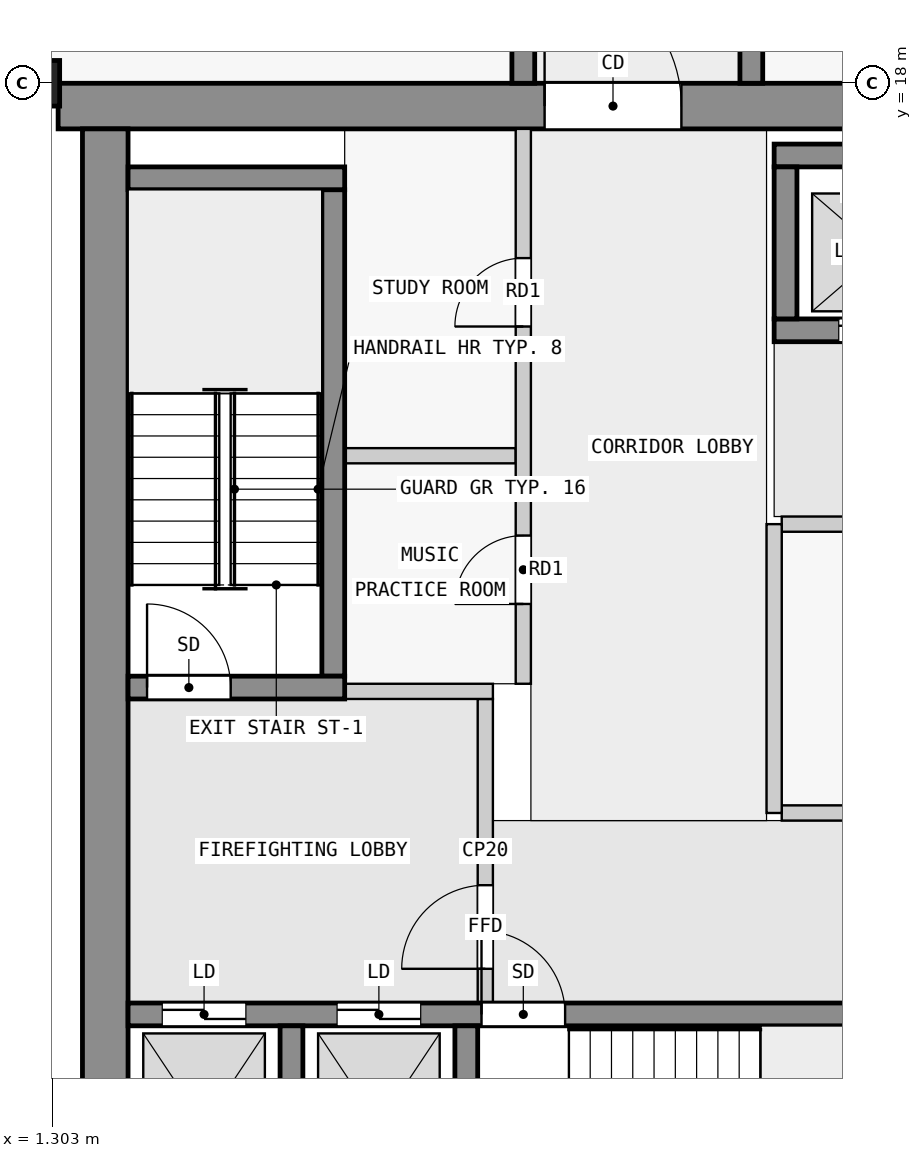
"""IFC4 building model, lengths in metres.
Left out: names, types, materials, properties, quantities, classifications, styles, units other than length and angle.
Written with IfcOpenShell. Run it as: python <this file> out.ifc"""

import sys

from ifc_helpers import new_model, si_unit, direction, frame, frame_2d, origin, origin_2d, place, context, subcontext, project, spatial, rectangle, extrude, element, fill, save


model = new_model("IFC4")
c1 = context("Model", 3, precision=1e-05, world=origin(), true_north=direction((0.0, 1.0)))
c2 = subcontext(c1, "Body", "Model", "MODEL_VIEW")
j1 = project(units=[si_unit("LENGTHUNIT", "METRE"), si_unit("PLANEANGLEUNIT", "RADIAN")], contexts=[c1])
p1 = place(None, origin())
s1 = spatial("IfcSite", under=j1, at=p1, CompositionType="ELEMENT")
p2 = place(p1, origin())
s2 = spatial("IfcBuilding", under=s1, at=p2, CompositionType="ELEMENT")
p3 = place(p2, frame((0.0, 0.0, 163.9)))
s3 = spatial("IfcBuildingStorey", under=s2, at=p3, CompositionType="ELEMENT", Elevation=163.9)
p4 = place(p3, frame((0.7, 18.0, 0.0), z_axis=(0.0, 0.0, 1.0), x_axis=(0.0, 1.0, 0.0)))
e1 = element("IfcColumn", 1, at=p4, inside=s3, PredefinedType="COLUMN", context=c2, shape_type="SweptSolid", body=[
    extrude(rectangle(XDim=0.6, YDim=1.4, at=origin_2d()), origin(), (0.0, 0.0, 1.0), 3.5),
])
p5 = place(p3, frame((1.38, 17.7, 0.0), z_axis=(0.0, 0.0, 1.0), x_axis=(1.0, 0.0, 0.0)))
e2 = element("IfcWall", 2, at=p5, inside=s3, PredefinedType="SHEAR", context=c2, shape_type="SweptSolid", body=[
    extrude(rectangle(XDim=21.12, YDim=0.6, at=frame_2d((10.56, 0.0))), origin(), (0.0, 0.0, 1.0), 3.25),
])
p6 = place(p5, frame((6.4, 0.0, 0.0)))
e3 = element("IfcOpeningElement", 3, at=p6, cuts=e2, PredefinedType="OPENING", context=c2, shape_type="SweptSolid", body=[
    extrude(rectangle(XDim=1.8, YDim=2.1, at=frame_2d((0.9, 1.05))), frame((0.0, 0.31, 0.0), z_axis=(0.0, -1.0, 0.0), x_axis=(1.0, 0.0, 0.0)), (0.0, 0.0, 1.0), 0.62),
])
p7 = place(p3, frame((2.0, 2.5, 0.0), z_axis=(0.0, 0.0, 1.0), x_axis=(0.0, 1.0, 0.0)))
e4 = element("IfcWall", 4, at=p7, inside=s3, PredefinedType="SHEAR", context=c2, shape_type="SweptSolid", body=[
    extrude(rectangle(XDim=14.9, YDim=0.6, at=frame_2d((7.45, 0.0))), origin(), (0.0, 0.0, 1.0), 3.25),
])
for number, where, z_axis, x_axis in (
    (5, (4.45, 2.8, 0.0), (0.0, 0.0, 1.0), (0.0, 1.0, 0.0)),
    (6, (6.75, 2.8, 0.0), (0.0, 0.0, 1.0), (0.0, 1.0, 0.0)),
):
    element("IfcWall", number, at=place(p3, frame(where, z_axis=z_axis, x_axis=x_axis)), inside=s3, PredefinedType="SHEAR", context=c2, shape_type="SweptSolid", body=[
        extrude(rectangle(XDim=2.8, YDim=0.3, at=frame_2d((1.4, 0.0))), origin(), (0.0, 0.0, 1.0), 3.25),
    ])
p8 = place(p3, frame((2.3, 5.75, 0.0), z_axis=(0.0, 0.0, 1.0), x_axis=(1.0, 0.0, 0.0)))
e7 = element("IfcWall", 7, at=p8, inside=s3, PredefinedType="SHEAR", context=c2, shape_type="SweptSolid", body=[
    extrude(rectangle(XDim=18.8, YDim=0.3, at=frame_2d((9.4, 0.0))), origin(), (0.0, 0.0, 1.0), 3.25),
])
p9 = place(p8, frame((4.65, 0.0, 0.0)))
e8 = element("IfcOpeningElement", 8, at=p9, cuts=e7, PredefinedType="OPENING", context=c2, shape_type="SweptSolid", body=[
    extrude(rectangle(XDim=1.1, YDim=2.1, at=frame_2d((0.55, 1.05))), frame((0.0, 0.16, 0.0), z_axis=(0.0, -1.0, 0.0), x_axis=(1.0, 0.0, 0.0)), (0.0, 0.0, 1.0), 0.32),
])
p10 = place(p8, frame((0.45, 0.0, 0.0)))
e9 = element("IfcOpeningElement", 9, at=p10, cuts=e7, PredefinedType="OPENING", context=c2, shape_type="SweptSolid", body=[
    extrude(rectangle(XDim=1.1, YDim=2.1, at=frame_2d((0.55, 1.05))), frame((0.0, 0.16, 0.0), z_axis=(0.0, -1.0, 0.0), x_axis=(1.0, 0.0, 0.0)), (0.0, 0.0, 1.0), 0.32),
])
p11 = place(p8, frame((2.75, 0.0, 0.0)))
e10 = element("IfcOpeningElement", 10, at=p11, cuts=e7, PredefinedType="OPENING", context=c2, shape_type="SweptSolid", body=[
    extrude(rectangle(XDim=1.1, YDim=2.1, at=frame_2d((0.55, 1.05))), frame((0.0, 0.16, 0.0), z_axis=(0.0, -1.0, 0.0), x_axis=(1.0, 0.0, 0.0)), (0.0, 0.0, 1.0), 0.32),
])
p12 = place(p8, frame((11.95, 0.0, 0.0)))
e11 = element("IfcOpeningElement", 11, at=p12, cuts=e7, PredefinedType="OPENING", context=c2, shape_type="SweptSolid", body=[
    extrude(rectangle(XDim=0.9, YDim=2.1, at=frame_2d((0.45, 1.05))), frame((0.0, 0.16, 0.0), z_axis=(0.0, -1.0, 0.0), x_axis=(1.0, 0.0, 0.0)), (0.0, 0.0, 1.0), 0.32),
])
p13 = place(p8, frame((15.7, 0.0, 0.0)))
e12 = element("IfcOpeningElement", 12, at=p13, cuts=e7, PredefinedType="OPENING", context=c2, shape_type="SweptSolid", body=[
    extrude(rectangle(XDim=0.9, YDim=2.1, at=frame_2d((0.45, 1.05))), frame((0.0, 0.16, 0.0), z_axis=(0.0, -1.0, 0.0), x_axis=(1.0, 0.0, 0.0)), (0.0, 0.0, 1.0), 0.32),
])
p14 = place(p3, frame((2.3, 10.05, 0.0), z_axis=(0.0, 0.0, 1.0), x_axis=(1.0, 0.0, 0.0)))
e13 = element("IfcWall", 13, at=p14, inside=s3, PredefinedType="SHEAR", context=c2, shape_type="SweptSolid", body=[
    extrude(rectangle(XDim=2.85, YDim=0.3, at=frame_2d((1.425, 0.0))), origin(), (0.0, 0.0, 1.0), 3.25),
])
p15 = place(p14, frame((0.25, 0.0, 0.0)))
e14 = element("IfcOpeningElement", 14, at=p15, cuts=e13, PredefinedType="OPENING", context=c2, shape_type="SweptSolid", body=[
    extrude(rectangle(XDim=1.1, YDim=2.1, at=frame_2d((0.55, 1.05))), frame((0.0, 0.16, 0.0), z_axis=(0.0, -1.0, 0.0), x_axis=(1.0, 0.0, 0.0)), (0.0, 0.0, 1.0), 0.32),
])
p16 = place(p3, frame((5.0, 10.2, 0.0), z_axis=(0.0, 0.0, 1.0), x_axis=(0.0, 1.0, 0.0)))
e15 = element("IfcWall", 15, at=p16, inside=s3, PredefinedType="SHEAR", context=c2, shape_type="SweptSolid", body=[
    extrude(rectangle(XDim=6.4, YDim=0.3, at=frame_2d((3.2, 0.0))), origin(), (0.0, 0.0, 1.0), 3.25),
])
p17 = place(p3, frame((2.3, 16.75, 0.0), z_axis=(0.0, 0.0, 1.0), x_axis=(1.0, 0.0, 0.0)))
e16 = element("IfcWall", 16, at=p17, inside=s3, PredefinedType="SHEAR", context=c2, shape_type="SweptSolid", body=[
    extrude(rectangle(XDim=2.85, YDim=0.3, at=frame_2d((1.425, 0.0))), origin(), (0.0, 0.0, 1.0), 3.25),
])
p18 = place(p3, frame((10.8, 17.05, 0.0), z_axis=(0.0, 0.0, 1.0), x_axis=(1.0, 0.0, 0.0)))
e17 = element("IfcWall", 17, at=p18, inside=s3, PredefinedType="SHEAR", context=c2, shape_type="SweptSolid", body=[
    extrude(rectangle(XDim=7.8, YDim=0.3, at=frame_2d((3.9, 0.0))), origin(), (0.0, 0.0, 1.0), 3.25),
])
p19 = place(p3, frame((10.8, 14.75, 0.0), z_axis=(0.0, 0.0, 1.0), x_axis=(1.0, 0.0, 0.0)))
e18 = element("IfcWall", 18, at=p19, inside=s3, PredefinedType="SHEAR", context=c2, shape_type="SweptSolid", body=[
    extrude(rectangle(XDim=7.8, YDim=0.3, at=frame_2d((3.9, 0.0))), origin(), (0.0, 0.0, 1.0), 3.25),
])
p20 = place(p19, frame((0.85, 0.0, 0.0)))
e19 = element("IfcOpeningElement", 19, at=p20, cuts=e18, PredefinedType="OPENING", context=c2, shape_type="SweptSolid", body=[
    extrude(rectangle(XDim=1.1, YDim=2.1, at=frame_2d((0.55, 1.05))), frame((0.0, 0.16, 0.0), z_axis=(0.0, -1.0, 0.0), x_axis=(1.0, 0.0, 0.0)), (0.0, 0.0, 1.0), 0.32),
])
p21 = place(p19, frame((3.35, 0.0, 0.0)))
e20 = element("IfcOpeningElement", 20, at=p21, cuts=e18, PredefinedType="OPENING", context=c2, shape_type="SweptSolid", body=[
    extrude(rectangle(XDim=1.1, YDim=2.1, at=frame_2d((0.55, 1.05))), frame((0.0, 0.16, 0.0), z_axis=(0.0, -1.0, 0.0), x_axis=(1.0, 0.0, 0.0)), (0.0, 0.0, 1.0), 0.32),
])
p22 = place(p19, frame((5.85, 0.0, 0.0)))
e21 = element("IfcOpeningElement", 21, at=p22, cuts=e18, PredefinedType="OPENING", context=c2, shape_type="SweptSolid", body=[
    extrude(rectangle(XDim=1.1, YDim=2.1, at=frame_2d((0.55, 1.05))), frame((0.0, 0.16, 0.0), z_axis=(0.0, -1.0, 0.0), x_axis=(1.0, 0.0, 0.0)), (0.0, 0.0, 1.0), 0.32),
])
p23 = place(p3, frame((10.95, 14.9, 0.0), z_axis=(0.0, 0.0, 1.0), x_axis=(0.0, 1.0, 0.0)))
e22 = element("IfcWall", 22, at=p23, inside=s3, PredefinedType="SHEAR", context=c2, shape_type="SweptSolid", body=[
    extrude(rectangle(XDim=2.0, YDim=0.3, at=frame_2d((1.0, 0.0))), origin(), (0.0, 0.0, 1.0), 3.25),
])
p24 = place(p3, frame((7.5, 18.0, 0.0), z_axis=(0.0, 0.0, 1.0), x_axis=(0.0, 1.0, 0.0)))
e23 = element("IfcWall", 23, at=p24, inside=s3, PredefinedType="SHEAR", context=c2, shape_type="SweptSolid", body=[
    extrude(rectangle(XDim=27.0, YDim=0.3, at=frame_2d((13.5, 0.0))), origin(), (0.0, 0.0, 1.0), 3.25),
])
p25 = place(p24, frame((1.75, 0.0, 0.0)))
e24 = element("IfcOpeningElement", 24, at=p25, cuts=e23, PredefinedType="OPENING", context=c2, shape_type="SweptSolid", body=[
    extrude(rectangle(XDim=1.0, YDim=2.1, at=frame_2d((0.5, 1.05))), frame((0.0, 0.16, 0.0), z_axis=(0.0, -1.0, 0.0), x_axis=(1.0, 0.0, 0.0)), (0.0, 0.0, 1.0), 0.32),
])
p26 = place(p24, frame((6.25, 0.0, 0.0)))
e25 = element("IfcOpeningElement", 25, at=p26, cuts=e23, PredefinedType="OPENING", context=c2, shape_type="SweptSolid", body=[
    extrude(rectangle(XDim=1.0, YDim=2.1, at=frame_2d((0.5, 1.05))), frame((0.0, 0.16, 0.0), z_axis=(0.0, -1.0, 0.0), x_axis=(1.0, 0.0, 0.0)), (0.0, 0.0, 1.0), 0.32),
])
p27 = place(p24, frame((10.75, 0.0, 0.0)))
e26 = element("IfcOpeningElement", 26, at=p27, cuts=e23, PredefinedType="OPENING", context=c2, shape_type="SweptSolid", body=[
    extrude(rectangle(XDim=1.0, YDim=2.1, at=frame_2d((0.5, 1.05))), frame((0.0, 0.16, 0.0), z_axis=(0.0, -1.0, 0.0), x_axis=(1.0, 0.0, 0.0)), (0.0, 0.0, 1.0), 0.32),
])
p28 = place(p24, frame((15.25, 0.0, 0.0)))
e27 = element("IfcOpeningElement", 27, at=p28, cuts=e23, PredefinedType="OPENING", context=c2, shape_type="SweptSolid", body=[
    extrude(rectangle(XDim=1.0, YDim=2.1, at=frame_2d((0.5, 1.05))), frame((0.0, 0.16, 0.0), z_axis=(0.0, -1.0, 0.0), x_axis=(1.0, 0.0, 0.0)), (0.0, 0.0, 1.0), 0.32),
])
p29 = place(p24, frame((21.35, 0.0, 0.0)))
e28 = element("IfcOpeningElement", 28, at=p29, cuts=e23, PredefinedType="OPENING", context=c2, shape_type="SweptSolid", body=[
    extrude(rectangle(XDim=1.0, YDim=2.1, at=frame_2d((0.5, 1.05))), frame((0.0, 0.16, 0.0), z_axis=(0.0, -1.0, 0.0), x_axis=(1.0, 0.0, 0.0)), (0.0, 0.0, 1.0), 0.32),
])
p30 = place(p3, frame((10.5, 18.0, 0.0), z_axis=(0.0, 0.0, 1.0), x_axis=(0.0, 1.0, 0.0)))
e29 = element("IfcWall", 29, at=p30, inside=s3, PredefinedType="SHEAR", context=c2, shape_type="SweptSolid", body=[
    extrude(rectangle(XDim=27.0, YDim=0.3, at=frame_2d((13.5, 0.0))), origin(), (0.0, 0.0, 1.0), 3.25),
])
p31 = place(p30, frame((1.75, 0.0, 0.0)))
e30 = element("IfcOpeningElement", 30, at=p31, cuts=e29, PredefinedType="OPENING", context=c2, shape_type="SweptSolid", body=[
    extrude(rectangle(XDim=1.0, YDim=2.1, at=frame_2d((0.5, 1.05))), frame((0.0, 0.16, 0.0), z_axis=(0.0, -1.0, 0.0), x_axis=(1.0, 0.0, 0.0)), (0.0, 0.0, 1.0), 0.32),
])
p32 = place(p30, frame((6.25, 0.0, 0.0)))
e31 = element("IfcOpeningElement", 31, at=p32, cuts=e29, PredefinedType="OPENING", context=c2, shape_type="SweptSolid", body=[
    extrude(rectangle(XDim=1.0, YDim=2.1, at=frame_2d((0.5, 1.05))), frame((0.0, 0.16, 0.0), z_axis=(0.0, -1.0, 0.0), x_axis=(1.0, 0.0, 0.0)), (0.0, 0.0, 1.0), 0.32),
])
p33 = place(p30, frame((10.35, 0.0, 0.0)))
e32 = element("IfcOpeningElement", 32, at=p33, cuts=e29, PredefinedType="OPENING", context=c2, shape_type="SweptSolid", body=[
    extrude(rectangle(XDim=1.8, YDim=2.1, at=frame_2d((0.9, 1.05))), frame((0.0, 0.16, 0.0), z_axis=(0.0, -1.0, 0.0), x_axis=(1.0, 0.0, 0.0)), (0.0, 0.0, 1.0), 0.32),
])
p34 = place(p30, frame((17.55, 0.0, 0.0)))
e33 = element("IfcOpeningElement", 33, at=p34, cuts=e29, PredefinedType="OPENING", context=c2, shape_type="SweptSolid", body=[
    extrude(rectangle(XDim=1.0, YDim=2.1, at=frame_2d((0.5, 1.05))), frame((0.0, 0.16, 0.0), z_axis=(0.0, -1.0, 0.0), x_axis=(1.0, 0.0, 0.0)), (0.0, 0.0, 1.0), 0.32),
])
p35 = place(p30, frame((23.25, 0.0, 0.0)))
e34 = element("IfcOpeningElement", 34, at=p35, cuts=e29, PredefinedType="OPENING", context=c2, shape_type="SweptSolid", body=[
    extrude(rectangle(XDim=0.9, YDim=2.1, at=frame_2d((0.45, 1.05))), frame((0.0, 0.16, 0.0), z_axis=(0.0, -1.0, 0.0), x_axis=(1.0, 0.0, 0.0)), (0.0, 0.0, 1.0), 0.32),
])
p36 = place(p30, frame((25.45, 0.0, 0.0)))
e35 = element("IfcOpeningElement", 35, at=p36, cuts=e29, PredefinedType="OPENING", context=c2, shape_type="SweptSolid", body=[
    extrude(rectangle(XDim=1.0, YDim=2.1, at=frame_2d((0.5, 1.05))), frame((0.0, 0.16, 0.0), z_axis=(0.0, -1.0, 0.0), x_axis=(1.0, 0.0, 0.0)), (0.0, 0.0, 1.0), 0.32),
])
p37 = place(p3, frame((7.0, 5.9, 0.0), z_axis=(0.0, 0.0, 1.0), x_axis=(0.0, 1.0, 0.0)))
e36 = element("IfcWall", 36, at=p37, inside=s3, PredefinedType="PARTITIONING", context=c2, shape_type="SweptSolid", body=[
    extrude(rectangle(XDim=4.0, YDim=0.2, at=frame_2d((2.0, 0.0))), origin(), (0.0, 0.0, 1.0), 3.25),
])
p38 = place(p37, frame((0.45, 0.0, 0.0)))
e37 = element("IfcOpeningElement", 37, at=p38, cuts=e36, PredefinedType="OPENING", context=c2, shape_type="SweptSolid", body=[
    extrude(rectangle(XDim=1.1, YDim=2.1, at=frame_2d((0.55, 1.05))), frame((0.0, 0.11, 0.0), z_axis=(0.0, -1.0, 0.0), x_axis=(1.0, 0.0, 0.0)), (0.0, 0.0, 1.0), 0.22),
])
p39 = place(p3, frame((5.15, 10.0, 0.0), z_axis=(0.0, 0.0, 1.0), x_axis=(1.0, 0.0, 0.0)))
e38 = element("IfcWall", 38, at=p39, inside=s3, PredefinedType="PARTITIONING", context=c2, shape_type="SweptSolid", body=[
    extrude(rectangle(XDim=1.95, YDim=0.2, at=frame_2d((0.975, 0.0))), origin(), (0.0, 0.0, 1.0), 3.25),
])
p40 = place(p3, frame((10.8, 8.4, 0.0), z_axis=(0.0, 0.0, 1.0), x_axis=(0.0, 1.0, 0.0)))
e39 = element("IfcWall", 39, at=p40, inside=s3, PredefinedType="PARTITIONING", context=c2, shape_type="SweptSolid", body=[
    extrude(rectangle(XDim=3.8, YDim=0.2, at=frame_2d((1.9, 0.0))), origin(), (0.0, 0.0, 1.0), 3.25),
])
p41 = place(p3, frame((10.9, 8.4, 0.0), z_axis=(0.0, 0.0, 1.0), x_axis=(1.0, 0.0, 0.0)))
e40 = element("IfcWall", 40, at=p41, inside=s3, PredefinedType="PARTITIONING", context=c2, shape_type="SweptSolid", body=[
    extrude(rectangle(XDim=8.5, YDim=0.2, at=frame_2d((4.25, 0.0))), origin(), (0.0, 0.0, 1.0), 3.25),
])
p42 = place(p3, frame((10.9, 12.2, 0.0), z_axis=(0.0, 0.0, 1.0), x_axis=(1.0, 0.0, 0.0)))
e41 = element("IfcWall", 41, at=p42, inside=s3, PredefinedType="PARTITIONING", context=c2, shape_type="SweptSolid", body=[
    extrude(rectangle(XDim=8.5, YDim=0.2, at=frame_2d((4.25, 0.0))), origin(), (0.0, 0.0, 1.0), 3.25),
])
p43 = place(p42, frame((1.4, 0.0, 0.0)))
e42 = element("IfcOpeningElement", 42, at=p43, cuts=e41, PredefinedType="OPENING", context=c2, shape_type="SweptSolid", body=[
    extrude(rectangle(XDim=0.9, YDim=2.1, at=frame_2d((0.45, 1.05))), frame((0.0, 0.11, 0.0), z_axis=(0.0, -1.0, 0.0), x_axis=(1.0, 0.0, 0.0)), (0.0, 0.0, 1.0), 0.22),
])
p44 = place(p42, frame((5.75, 0.0, 0.0)))
e43 = element("IfcOpeningElement", 43, at=p44, cuts=e41, PredefinedType="OPENING", context=c2, shape_type="SweptSolid", body=[
    extrude(rectangle(XDim=0.9, YDim=2.1, at=frame_2d((0.45, 1.05))), frame((0.0, 0.11, 0.0), z_axis=(0.0, -1.0, 0.0), x_axis=(1.0, 0.0, 0.0)), (0.0, 0.0, 1.0), 0.22),
])
p45 = place(p3, frame((7.5, 10.1, 0.0), z_axis=(0.0, 0.0, 1.0), x_axis=(0.0, 1.0, 0.0)))
e44 = element("IfcWall", 44, at=p45, inside=s3, PredefinedType="PARTITIONING", context=c2, shape_type="SweptSolid", body=[
    extrude(rectangle(XDim=7.3, YDim=0.2, at=frame_2d((3.65, 0.0))), origin(), (0.0, 0.0, 1.0), 3.25),
])
p46 = place(p45, frame((1.05, 0.0, 0.0)))
e45 = element("IfcOpeningElement", 45, at=p46, cuts=e44, PredefinedType="OPENING", context=c2, shape_type="SweptSolid", body=[
    extrude(rectangle(XDim=0.9, YDim=2.1, at=frame_2d((0.45, 1.05))), frame((0.0, 0.11, 0.0), z_axis=(0.0, -1.0, 0.0), x_axis=(1.0, 0.0, 0.0)), (0.0, 0.0, 1.0), 0.22),
])
p47 = place(p45, frame((4.7, 0.0, 0.0)))
e46 = element("IfcOpeningElement", 46, at=p47, cuts=e44, PredefinedType="OPENING", context=c2, shape_type="SweptSolid", body=[
    extrude(rectangle(XDim=0.9, YDim=2.1, at=frame_2d((0.45, 1.05))), frame((0.0, 0.11, 0.0), z_axis=(0.0, -1.0, 0.0), x_axis=(1.0, 0.0, 0.0)), (0.0, 0.0, 1.0), 0.22),
])
p48 = place(p3, frame((5.15, 13.1, 0.0), z_axis=(0.0, 0.0, 1.0), x_axis=(1.0, 0.0, 0.0)))
e47 = element("IfcWall", 47, at=p48, inside=s3, PredefinedType="PARTITIONING", context=c2, shape_type="SweptSolid", body=[
    extrude(rectangle(XDim=2.25, YDim=0.2, at=frame_2d((1.125, 0.0))), origin(), (0.0, 0.0, 1.0), 3.25),
])
p49 = place(p38, origin())
e48 = element("IfcDoor", 48, at=p49, inside=s3, OperationType="SINGLE_SWING_LEFT", PredefinedType="DOOR", context=c2, shape_type="SweptSolid", body=[
    extrude(rectangle(XDim=1.1, YDim=2.1, at=frame_2d((0.55, 1.05))), frame((0.0, 0.025, 0.0), z_axis=(0.0, -1.0, 0.0), x_axis=(1.0, 0.0, 0.0)), (0.0, 0.0, 1.0), 0.05),
])
fill(e37, e48)
p50 = place(p15, origin())
e49 = element("IfcDoor", 49, at=p50, inside=s3, OperationType="SINGLE_SWING_RIGHT", PredefinedType="DOOR", context=c2, shape_type="SweptSolid", body=[
    extrude(rectangle(XDim=1.1, YDim=2.1, at=frame_2d((0.55, 1.05))), frame((0.0, 0.025, 0.0), z_axis=(0.0, -1.0, 0.0), x_axis=(1.0, 0.0, 0.0)), (0.0, 0.0, 1.0), 0.05),
])
fill(e14, e49)
p51 = place(p9, origin())
e50 = element("IfcDoor", 50, at=p51, inside=s3, OperationType="SINGLE_SWING_LEFT", PredefinedType="DOOR", context=c2, shape_type="SweptSolid", body=[
    extrude(rectangle(XDim=1.1, YDim=2.1, at=frame_2d((0.55, 1.05))), frame((0.0, 0.025, 0.0), z_axis=(0.0, -1.0, 0.0), x_axis=(1.0, 0.0, 0.0)), (0.0, 0.0, 1.0), 0.05),
])
fill(e8, e50)
p52 = place(p10, origin())
e51 = element("IfcDoor", 51, at=p52, inside=s3, OperationType="DOUBLE_DOOR_SLIDING", PredefinedType="DOOR", context=c2, shape_type="SweptSolid", body=[
    extrude(rectangle(XDim=1.1, YDim=2.1, at=frame_2d((0.55, 1.05))), frame((0.0, 0.025, 0.0), z_axis=(0.0, -1.0, 0.0), x_axis=(1.0, 0.0, 0.0)), (0.0, 0.0, 1.0), 0.05),
])
fill(e9, e51)
p53 = place(p11, origin())
e52 = element("IfcDoor", 52, at=p53, inside=s3, OperationType="DOUBLE_DOOR_SLIDING", PredefinedType="DOOR", context=c2, shape_type="SweptSolid", body=[
    extrude(rectangle(XDim=1.1, YDim=2.1, at=frame_2d((0.55, 1.05))), frame((0.0, 0.025, 0.0), z_axis=(0.0, -1.0, 0.0), x_axis=(1.0, 0.0, 0.0)), (0.0, 0.0, 1.0), 0.05),
])
fill(e10, e52)
p54 = place(p20, origin())
e53 = element("IfcDoor", 53, at=p54, inside=s3, OperationType="DOUBLE_DOOR_SLIDING", PredefinedType="DOOR", context=c2, shape_type="SweptSolid", body=[
    extrude(rectangle(XDim=1.1, YDim=2.1, at=frame_2d((0.55, 1.05))), frame((0.0, 0.025, 0.0), z_axis=(0.0, -1.0, 0.0), x_axis=(1.0, 0.0, 0.0)), (0.0, 0.0, 1.0), 0.05),
])
fill(e19, e53)
p55 = place(p6, origin())
e54 = element("IfcDoor", 54, at=p55, inside=s3, OperationType="DOUBLE_DOOR_SINGLE_SWING", PredefinedType="DOOR", context=c2, shape_type="SweptSolid", body=[
    extrude(rectangle(XDim=1.8, YDim=2.1, at=frame_2d((0.9, 1.05))), frame((0.0, 0.025, 0.0), z_axis=(0.0, -1.0, 0.0), x_axis=(1.0, 0.0, 0.0)), (0.0, 0.0, 1.0), 0.05),
])
fill(e3, e54)
p56 = place(p46, origin())
e55 = element("IfcDoor", 55, at=p56, inside=s3, OperationType="SINGLE_SWING_RIGHT", PredefinedType="DOOR", context=c2, shape_type="SweptSolid", body=[
    extrude(rectangle(XDim=0.9, YDim=2.1, at=frame_2d((0.45, 1.05))), frame((0.0, 0.025, 0.0), z_axis=(0.0, -1.0, 0.0), x_axis=(1.0, 0.0, 0.0)), (0.0, 0.0, 1.0), 0.05),
])
fill(e45, e55)
p57 = place(p47, origin())
e56 = element("IfcDoor", 56, at=p57, inside=s3, OperationType="SINGLE_SWING_RIGHT", PredefinedType="DOOR", context=c2, shape_type="SweptSolid", body=[
    extrude(rectangle(XDim=0.9, YDim=2.1, at=frame_2d((0.45, 1.05))), frame((0.0, 0.025, 0.0), z_axis=(0.0, -1.0, 0.0), x_axis=(1.0, 0.0, 0.0)), (0.0, 0.0, 1.0), 0.05),
])
fill(e46, e56)
save(model, sys.argv[1])
